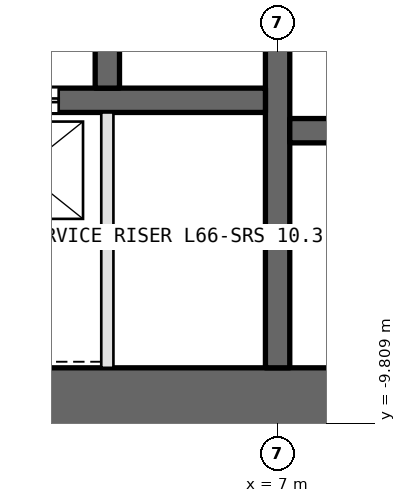
"""IFC4 building model, lengths in metres.
Left out: names, types, materials, properties, quantities, classifications, styles, units other than length and angle.
Written with IfcOpenShell. Run it as: python <this file> out.ifc"""

import sys

from ifc_helpers import new_model, si_unit, direction, frame, frame_2d, origin, place, context, subcontext, project, spatial, rectangle, extrude, element, fill, save


model = new_model("IFC4")
c1 = context("Model", 3, precision=1e-05, world=origin(), true_north=direction((0.0, 1.0)))
c2 = subcontext(c1, "Body", "Model", "MODEL_VIEW")
j1 = project(units=[si_unit("LENGTHUNIT", "METRE"), si_unit("PLANEANGLEUNIT", "RADIAN")], contexts=[c1])
p1 = place(None, origin())
s1 = spatial("IfcSite", under=j1, at=p1, CompositionType="ELEMENT")
p2 = place(p1, origin())
s2 = spatial("IfcBuilding", under=s1, at=p2, CompositionType="ELEMENT")
p3 = place(p2, frame((0.0, 0.0, 296.4)))
s3 = spatial("IfcBuildingStorey", under=s2, at=p3, CompositionType="ELEMENT", Elevation=296.4)
p4 = place(p3, frame((-13.9, -9.4, 0.0), z_axis=(0.0, 0.0, 1.0), x_axis=(1.0, 0.0, 0.0)))
e1 = element("IfcWall", 1, at=p4, inside=s3, PredefinedType="SHEAR", context=c2, shape_type="SweptSolid", body=[
    extrude(rectangle(XDim=27.8, YDim=1.0, at=frame_2d((13.9, 0.0))), origin(), (0.0, 0.0, 1.0), 4.2),
])
p5 = place(p4, frame((22.95, 0.0, 0.0)))
e2 = element("IfcOpeningElement", 2, at=p5, cuts=e1, PredefinedType="OPENING", context=c2, shape_type="SweptSolid", body=[
    extrude(rectangle(XDim=2.2, YDim=2.7, at=frame_2d((1.1, 1.35))), frame((0.0, 0.51, 0.0), z_axis=(0.0, -1.0, 0.0), x_axis=(1.0, 0.0, 0.0)), (0.0, 0.0, 1.0), 1.02),
])
p6 = place(p3, frame((7.0, -8.9, 0.0), z_axis=(0.0, 0.0, 1.0), x_axis=(0.0, 1.0, 0.0)))
e3 = element("IfcWall", 3, at=p6, inside=s3, PredefinedType="SHEAR", context=c2, shape_type="SweptSolid", body=[
    extrude(rectangle(XDim=17.8, YDim=0.4, at=frame_2d((8.9, 0.0))), origin(), (0.0, 0.0, 1.0), 4.2),
])
p7 = place(p6, frame((8.0, 0.0, 0.0)))
e4 = element("IfcOpeningElement", 4, at=p7, cuts=e3, PredefinedType="OPENING", context=c2, shape_type="SweptSolid", body=[
    extrude(rectangle(XDim=1.8, YDim=2.4, at=frame_2d((0.9, 1.2))), frame((0.0, 0.21, 0.0), z_axis=(0.0, -1.0, 0.0), x_axis=(1.0, 0.0, 0.0)), (0.0, 0.0, 1.0), 0.42),
])
p8 = place(p3, frame((-6.8, -4.5, 0.0), z_axis=(0.0, 0.0, 1.0), x_axis=(1.0, 0.0, 0.0)))
e5 = element("IfcWall", 5, at=p8, inside=s3, PredefinedType="SHEAR", context=c2, shape_type="SweptSolid", body=[
    extrude(rectangle(XDim=13.6, YDim=0.4, at=frame_2d((6.8, 0.0))), origin(), (0.0, 0.0, 1.0), 4.2),
])
p9 = place(p8, frame((0.7, 0.0, 0.0)))
e6 = element("IfcOpeningElement", 6, at=p9, cuts=e5, PredefinedType="OPENING", context=c2, shape_type="SweptSolid", body=[
    extrude(rectangle(XDim=1.1, YDim=2.4, at=frame_2d((0.55, 1.2))), frame((0.0, 0.21, 0.0), z_axis=(0.0, -1.0, 0.0), x_axis=(1.0, 0.0, 0.0)), (0.0, 0.0, 1.0), 0.42),
])
p10 = place(p8, frame((3.5, 0.0, 0.0)))
e7 = element("IfcOpeningElement", 7, at=p10, cuts=e5, PredefinedType="OPENING", context=c2, shape_type="SweptSolid", body=[
    extrude(rectangle(XDim=1.1, YDim=2.4, at=frame_2d((0.55, 1.2))), frame((0.0, 0.21, 0.0), z_axis=(0.0, -1.0, 0.0), x_axis=(1.0, 0.0, 0.0)), (0.0, 0.0, 1.0), 0.42),
])
p11 = place(p8, frame((6.3, 0.0, 0.0)))
e8 = element("IfcOpeningElement", 8, at=p11, cuts=e5, PredefinedType="OPENING", context=c2, shape_type="SweptSolid", body=[
    extrude(rectangle(XDim=1.1, YDim=2.4, at=frame_2d((0.55, 1.2))), frame((0.0, 0.21, 0.0), z_axis=(0.0, -1.0, 0.0), x_axis=(1.0, 0.0, 0.0)), (0.0, 0.0, 1.0), 0.42),
])
p12 = place(p8, frame((9.1, 0.0, 0.0)))
e9 = element("IfcOpeningElement", 9, at=p12, cuts=e5, PredefinedType="OPENING", context=c2, shape_type="SweptSolid", body=[
    extrude(rectangle(XDim=1.1, YDim=2.4, at=frame_2d((0.55, 1.2))), frame((0.0, 0.21, 0.0), z_axis=(0.0, -1.0, 0.0), x_axis=(1.0, 0.0, 0.0)), (0.0, 0.0, 1.0), 0.42),
])
p13 = place(p3, frame((7.2, -5.0, 0.0), z_axis=(0.0, 0.0, 1.0), x_axis=(1.0, 0.0, 0.0)))
e10 = element("IfcWall", 10, at=p13, inside=s3, PredefinedType="SHEAR", context=c2, shape_type="SweptSolid", body=[
    extrude(rectangle(XDim=5.7, YDim=0.4, at=frame_2d((2.85, 0.0))), origin(), (0.0, 0.0, 1.0), 4.2),
])
p14 = place(p3, frame((4.2, -4.3, 0.0), z_axis=(0.0, 0.0, 1.0), x_axis=(0.0, 1.0, 0.0)))
e11 = element("IfcWall", 11, at=p14, inside=s3, PredefinedType="SHEAR", context=c2, shape_type="SweptSolid", body=[
    extrude(rectangle(XDim=2.5, YDim=0.4, at=frame_2d((1.25, 0.0))), origin(), (0.0, 0.0, 1.0), 4.2),
])
p15 = place(p3, frame((4.2, -4.7, 0.0), z_axis=(0.0, 0.0, 1.0), x_axis=(0.0, -1.0, 0.0)))
e12 = element("IfcWall", 12, at=p15, inside=s3, PredefinedType="PARTITIONING", context=c2, shape_type="SweptSolid", body=[
    extrude(rectangle(XDim=4.2, YDim=0.2, at=frame_2d((2.1, 0.0))), origin(), (0.0, 0.0, 1.0), 4.2),
])
p16 = place(p12, origin())
e13 = element("IfcDoor", 13, at=p16, inside=s3, OperationType="DOUBLE_DOOR_SLIDING", PredefinedType="DOOR", context=c2, shape_type="SweptSolid", body=[
    extrude(rectangle(XDim=1.1, YDim=2.4, at=frame_2d((0.55, 1.2))), frame((0.0, 0.025, 0.0), z_axis=(0.0, -1.0, 0.0), x_axis=(1.0, 0.0, 0.0)), (0.0, 0.0, 1.0), 0.05),
])
fill(e9, e13)
save(model, sys.argv[1])
